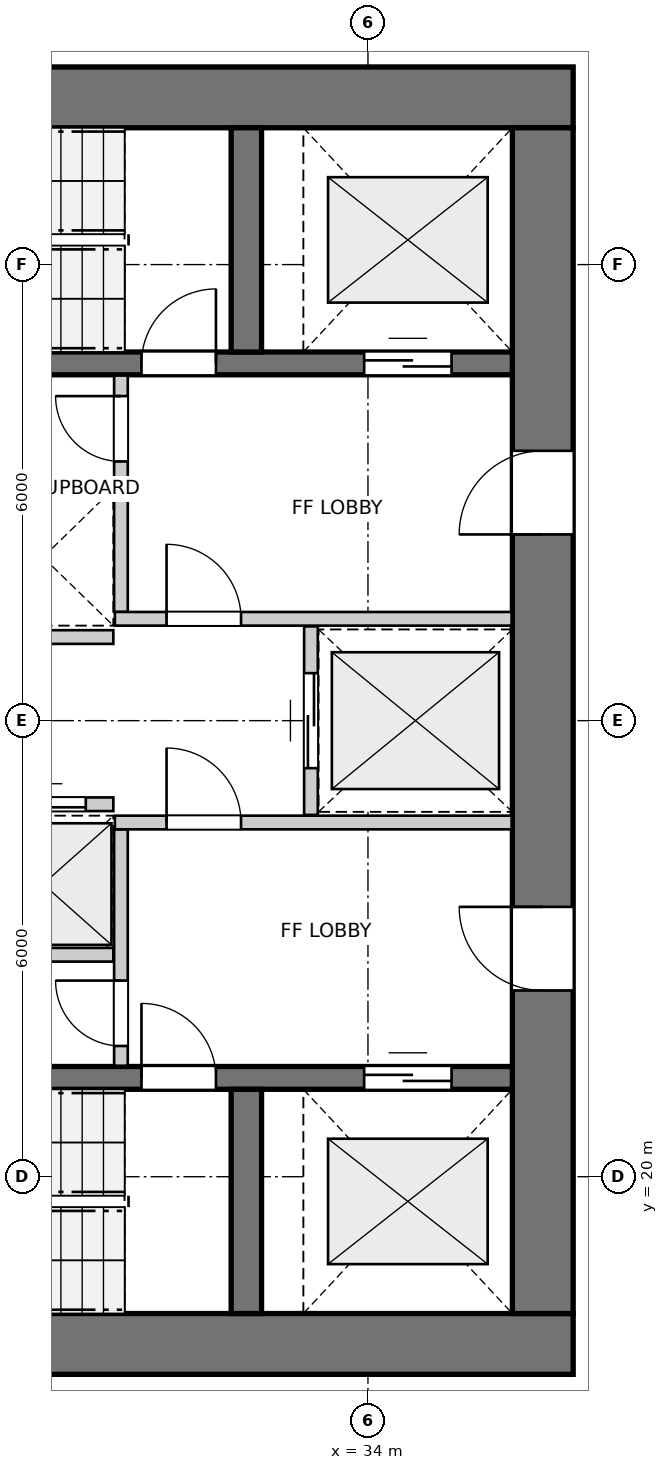
"""IFC4 building model, lengths in metres.
Left out: names, types, materials, properties, quantities, classifications, styles, units other than length and angle.
Written with IfcOpenShell. Run it as: python <this file> out.ifc"""

import sys

from ifc_helpers import new_model, si_unit, direction, frame, frame_2d, origin, place, context, subcontext, project, spatial, rectangle, extrude, source, transform, mapped, element, fill, save


model = new_model("IFC4")
c1 = context("Model", 3, precision=1e-05, world=origin(), true_north=direction((0.0, 1.0)))
c2 = subcontext(c1, "Body", "Model", "MODEL_VIEW")
j1 = project(units=[si_unit("LENGTHUNIT", "METRE"), si_unit("PLANEANGLEUNIT", "RADIAN")], contexts=[c1])
p1 = place(None, origin())
s1 = spatial("IfcSite", under=j1, at=p1, CompositionType="ELEMENT")
p2 = place(p1, origin())
s2 = spatial("IfcBuilding", under=s1, at=p2, CompositionType="ELEMENT")
p3 = place(p2, frame((0.0, 0.0, 23.8)))
s3 = spatial("IfcBuildingStorey", under=s2, at=p3, CompositionType="ELEMENT", Elevation=23.8)
for number, where, z_axis, x_axis in (
    (1, (24.0, 17.8, 0.0), (0.0, 0.0, 1.0), (1.0, 0.0, 0.0)),
    (2, (36.7, 34.2, 0.0), (0.0, 0.0, 1.0), (-1.0, 0.0, 0.0)),
):
    element("IfcWall", number, at=place(p3, frame(where, z_axis=z_axis, x_axis=x_axis)), inside=s3, PredefinedType="SHEAR", context=c2, shape_type="SweptSolid", body=[
        extrude(rectangle(XDim=12.7, YDim=0.8, at=frame_2d((6.35, 0.0))), origin(), (0.0, 0.0, 1.0), 2.935),
    ])
p4 = place(p3, frame((36.3, 18.2, 0.0), z_axis=(0.0, 0.0, 1.0), x_axis=(0.0, 1.0, 0.0)))
e3 = element("IfcWall", 3, at=p4, inside=s3, PredefinedType="SHEAR", context=c2, shape_type="SweptSolid", body=[
    extrude(rectangle(XDim=15.6, YDim=0.8, at=frame_2d((7.8, 0.0))), origin(), (0.0, 0.0, 1.0), 2.935),
])
p5 = place(p4, frame((4.25, 0.0, 0.0)))
e4 = element("IfcOpeningElement", 4, at=p5, cuts=e3, PredefinedType="OPENING", context=c2, shape_type="SweptSolid", body=[
    extrude(rectangle(XDim=1.1, YDim=2.15, at=frame_2d((0.55, 1.075))), frame((0.0, 0.41, 0.0), z_axis=(0.0, -1.0, 0.0), x_axis=(1.0, 0.0, 0.0)), (0.0, 0.0, 1.0), 0.82),
])
p6 = place(p4, frame((10.25, 0.0, 0.0)))
e5 = element("IfcOpeningElement", 5, at=p6, cuts=e3, PredefinedType="OPENING", context=c2, shape_type="SweptSolid", body=[
    extrude(rectangle(XDim=1.1, YDim=2.15, at=frame_2d((0.55, 1.075))), frame((0.0, 0.41, 0.0), z_axis=(0.0, -1.0, 0.0), x_axis=(1.0, 0.0, 0.0)), (0.0, 0.0, 1.0), 0.82),
])
p7 = place(p3, frame((24.8, 21.3, 0.0), z_axis=(0.0, 0.0, 1.0), x_axis=(1.0, 0.0, 0.0)))
e6 = element("IfcWall", 6, at=p7, inside=s3, PredefinedType="SHEAR", context=c2, shape_type="SweptSolid", body=[
    extrude(rectangle(XDim=11.1, YDim=0.3, at=frame_2d((5.55, 0.0))), origin(), (0.0, 0.0, 1.0), 2.935),
])
p8 = place(p7, frame((6.22, 0.0, 0.0)))
e7 = element("IfcOpeningElement", 7, at=p8, cuts=e6, PredefinedType="OPENING", context=c2, shape_type="SweptSolid", body=[
    extrude(rectangle(XDim=0.98, YDim=2.15, at=frame_2d((0.49, 1.075))), frame((0.0, 0.16, 0.0), z_axis=(0.0, -1.0, 0.0), x_axis=(1.0, 0.0, 0.0)), (0.0, 0.0, 1.0), 0.32),
])
p9 = place(p7, frame((9.15, 0.0, 0.0)))
e8 = element("IfcOpeningElement", 8, at=p9, cuts=e6, PredefinedType="OPENING", context=c2, shape_type="SweptSolid", body=[
    extrude(rectangle(XDim=1.15, YDim=2.15, at=frame_2d((0.575, 1.075))), frame((0.0, 0.16, 0.0), z_axis=(0.0, -1.0, 0.0), x_axis=(1.0, 0.0, 0.0)), (0.0, 0.0, 1.0), 0.32),
])
p10 = place(p3, frame((32.4, 18.2, 0.0), z_axis=(0.0, 0.0, 1.0), x_axis=(0.0, 1.0, 0.0)))
e9 = element("IfcWall", 9, at=p10, inside=s3, PredefinedType="SHEAR", context=c2, shape_type="SweptSolid", body=[
    extrude(rectangle(XDim=2.95, YDim=0.4, at=frame_2d((1.475, 0.0))), origin(), (0.0, 0.0, 1.0), 2.935),
])
p11 = place(p3, frame((24.8, 30.7, 0.0), z_axis=(0.0, 0.0, 1.0), x_axis=(1.0, 0.0, 0.0)))
e10 = element("IfcWall", 10, at=p11, inside=s3, PredefinedType="SHEAR", context=c2, shape_type="SweptSolid", body=[
    extrude(rectangle(XDim=11.1, YDim=0.3, at=frame_2d((5.55, 0.0))), origin(), (0.0, 0.0, 1.0), 2.935),
])
p12 = place(p11, frame((6.22, 0.0, 0.0)))
e11 = element("IfcOpeningElement", 11, at=p12, cuts=e10, PredefinedType="OPENING", context=c2, shape_type="SweptSolid", body=[
    extrude(rectangle(XDim=0.98, YDim=2.15, at=frame_2d((0.49, 1.075))), frame((0.0, 0.16, 0.0), z_axis=(0.0, -1.0, 0.0), x_axis=(1.0, 0.0, 0.0)), (0.0, 0.0, 1.0), 0.32),
])
p13 = place(p11, frame((9.15, 0.0, 0.0)))
e12 = element("IfcOpeningElement", 12, at=p13, cuts=e10, PredefinedType="OPENING", context=c2, shape_type="SweptSolid", body=[
    extrude(rectangle(XDim=1.15, YDim=2.15, at=frame_2d((0.575, 1.075))), frame((0.0, 0.16, 0.0), z_axis=(0.0, -1.0, 0.0), x_axis=(1.0, 0.0, 0.0)), (0.0, 0.0, 1.0), 0.32),
])
p14 = place(p3, frame((32.4, 30.85, 0.0), z_axis=(0.0, 0.0, 1.0), x_axis=(0.0, 1.0, 0.0)))
e13 = element("IfcWall", 13, at=p14, inside=s3, PredefinedType="SHEAR", context=c2, shape_type="SweptSolid", body=[
    extrude(rectangle(XDim=2.95, YDim=0.4, at=frame_2d((1.475, 0.0))), origin(), (0.0, 0.0, 1.0), 2.935),
])
p15 = place(p3, frame((30.75, 21.46, 0.0), z_axis=(0.0, 0.0, 1.0), x_axis=(0.0, 1.0, 0.0)))
e14 = element("IfcWall", 14, at=p15, inside=s3, PredefinedType="PARTITIONING", context=c2, shape_type="SweptSolid", body=[
    extrude(rectangle(XDim=3.11, YDim=0.18, at=frame_2d((1.555, 0.0))), origin(), (0.0, 0.0, 1.0), 2.935),
])
p16 = place(p15, frame((0.26, 0.0, 0.0)))
e15 = element("IfcOpeningElement", 15, at=p16, cuts=e14, PredefinedType="OPENING", context=c2, shape_type="SweptSolid", body=[
    extrude(rectangle(XDim=0.86, YDim=2.05, at=frame_2d((0.43, 1.025))), frame((0.0, 0.1, 0.0), z_axis=(0.0, -1.0, 0.0), x_axis=(1.0, 0.0, 0.0)), (0.0, 0.0, 1.0), 0.2),
])
p17 = place(p3, frame((30.67, 24.66, 0.0), z_axis=(0.0, 0.0, 1.0), x_axis=(1.0, 0.0, 0.0)))
e16 = element("IfcWall", 16, at=p17, inside=s3, PredefinedType="PARTITIONING", context=c2, shape_type="SweptSolid", body=[
    extrude(rectangle(XDim=5.22, YDim=0.18, at=frame_2d((2.61, 0.0))), origin(), (0.0, 0.0, 1.0), 2.935),
])
p18 = place(p17, frame((0.68, 0.0, 0.0)))
e17 = element("IfcOpeningElement", 17, at=p18, cuts=e16, PredefinedType="OPENING", context=c2, shape_type="SweptSolid", body=[
    extrude(rectangle(XDim=0.98, YDim=2.15, at=frame_2d((0.49, 1.075))), frame((0.0, 0.1, 0.0), z_axis=(0.0, -1.0, 0.0), x_axis=(1.0, 0.0, 0.0)), (0.0, 0.0, 1.0), 0.2),
])
p19 = place(p3, frame((30.75, 27.43, 0.0), z_axis=(0.0, 0.0, 1.0), x_axis=(0.0, 1.0, 0.0)))
e18 = element("IfcWall", 18, at=p19, inside=s3, PredefinedType="PARTITIONING", context=c2, shape_type="SweptSolid", body=[
    extrude(rectangle(XDim=3.11, YDim=0.18, at=frame_2d((1.555, 0.0))), origin(), (0.0, 0.0, 1.0), 2.935),
])
p20 = place(p19, frame((1.98, 0.0, 0.0)))
e19 = element("IfcOpeningElement", 19, at=p20, cuts=e18, PredefinedType="OPENING", context=c2, shape_type="SweptSolid", body=[
    extrude(rectangle(XDim=0.86, YDim=2.05, at=frame_2d((0.43, 1.025))), frame((0.0, 0.1, 0.0), z_axis=(0.0, -1.0, 0.0), x_axis=(1.0, 0.0, 0.0)), (0.0, 0.0, 1.0), 0.2),
])
p21 = place(p3, frame((30.67, 27.34, 0.0), z_axis=(0.0, 0.0, 1.0), x_axis=(1.0, 0.0, 0.0)))
e20 = element("IfcWall", 20, at=p21, inside=s3, PredefinedType="PARTITIONING", context=c2, shape_type="SweptSolid", body=[
    extrude(rectangle(XDim=5.22, YDim=0.18, at=frame_2d((2.61, 0.0))), origin(), (0.0, 0.0, 1.0), 2.935),
])
p22 = place(p21, frame((0.68, 0.0, 0.0)))
e21 = element("IfcOpeningElement", 21, at=p22, cuts=e20, PredefinedType="OPENING", context=c2, shape_type="SweptSolid", body=[
    extrude(rectangle(XDim=0.98, YDim=2.15, at=frame_2d((0.49, 1.075))), frame((0.0, 0.1, 0.0), z_axis=(0.0, -1.0, 0.0), x_axis=(1.0, 0.0, 0.0)), (0.0, 0.0, 1.0), 0.2),
])
p23 = place(p3, frame((33.25, 24.76, 0.0), z_axis=(0.0, 0.0, 1.0), x_axis=(0.0, 1.0, 0.0)))
e22 = element("IfcWall", 22, at=p23, inside=s3, PredefinedType="PARTITIONING", context=c2, shape_type="SweptSolid", body=[
    extrude(rectangle(XDim=2.48, YDim=0.18, at=frame_2d((1.24, 0.0))), origin(), (0.0, 0.0, 1.0), 2.935),
])
p24 = place(p23, frame((0.615, 0.0, 0.0)))
e23 = element("IfcOpeningElement", 23, at=p24, cuts=e22, PredefinedType="OPENING", context=c2, shape_type="SweptSolid", body=[
    extrude(rectangle(XDim=1.25, YDim=2.15, at=frame_2d((0.625, 1.075))), frame((0.0, 0.1, 0.0), z_axis=(0.0, -1.0, 0.0), x_axis=(1.0, 0.0, 0.0)), (0.0, 0.0, 1.0), 0.2),
])
p25 = place(p3, frame((24.81, 22.92, 0.0), z_axis=(0.0, 0.0, 1.0), x_axis=(1.0, 0.0, 0.0)))
e24 = element("IfcWall", 24, at=p25, inside=s3, PredefinedType="PARTITIONING", context=c2, shape_type="SweptSolid", body=[
    extrude(rectangle(XDim=5.84, YDim=0.18, at=frame_2d((2.92, 0.0))), origin(), (0.0, 0.0, 1.0), 2.935),
])
p26 = place(p3, frame((28.825, 24.9, 0.0), z_axis=(0.0, 0.0, 1.0), x_axis=(1.0, 0.0, 0.0)))
e25 = element("IfcWall", 25, at=p26, inside=s3, PredefinedType="PARTITIONING", context=c2, shape_type="SweptSolid", body=[
    extrude(rectangle(XDim=1.825, YDim=0.18, at=frame_2d((0.913, 0.0))), origin(), (0.0, 0.0, 1.0), 2.935),
])
p27 = place(p26, frame((0.363, 0.0, 0.0)))
e26 = element("IfcOpeningElement", 26, at=p27, cuts=e25, PredefinedType="OPENING", context=c2, shape_type="SweptSolid", body=[
    extrude(rectangle(XDim=1.1, YDim=2.15, at=frame_2d((0.55, 1.075))), frame((0.0, 0.1, 0.0), z_axis=(0.0, -1.0, 0.0), x_axis=(1.0, 0.0, 0.0)), (0.0, 0.0, 1.0), 0.2),
])
p28 = place(p3, frame((24.81, 29.08, 0.0), z_axis=(0.0, 0.0, 1.0), x_axis=(1.0, 0.0, 0.0)))
e27 = element("IfcWall", 27, at=p28, inside=s3, PredefinedType="PARTITIONING", context=c2, shape_type="SweptSolid", body=[
    extrude(rectangle(XDim=5.84, YDim=0.18, at=frame_2d((2.92, 0.0))), origin(), (0.0, 0.0, 1.0), 2.935),
])
p29 = place(p3, frame((28.825, 27.1, 0.0), z_axis=(0.0, 0.0, 1.0), x_axis=(1.0, 0.0, 0.0)))
e28 = element("IfcWall", 28, at=p29, inside=s3, PredefinedType="PARTITIONING", context=c2, shape_type="SweptSolid", body=[
    extrude(rectangle(XDim=1.825, YDim=0.18, at=frame_2d((0.913, 0.0))), origin(), (0.0, 0.0, 1.0), 2.935),
])
m1 = source(origin(), c2, "Body", "SweptSolid", [
    extrude(rectangle(XDim=0.98, YDim=2.15, at=frame_2d((0.49, 1.075))), frame((0.0, 0.025, 0.0), z_axis=(0.0, -1.0, 0.0), x_axis=(1.0, 0.0, 0.0)), (0.0, 0.0, 1.0), 0.05),
])
p30 = place(p8, origin())
e29 = element("IfcDoor", 29, at=p30, inside=s3, OperationType="SINGLE_SWING_LEFT", PredefinedType="DOOR", context=c2, shape_type="MappedRepresentation", body=[
    mapped(m1, transform((0.0, 0.0, 0.0), x_axis=(1.0, 0.0, 0.0), y_axis=(0.0, 1.0, 0.0), z_axis=(0.0, 0.0, 1.0), scale=1.0)),
])
fill(e7, e29)
m2 = source(origin(), c2, "Body", "SweptSolid", [
    extrude(rectangle(XDim=1.15, YDim=2.15, at=frame_2d((0.575, 1.075))), frame((0.0, 0.025, 0.0), z_axis=(0.0, -1.0, 0.0), x_axis=(1.0, 0.0, 0.0)), (0.0, 0.0, 1.0), 0.05),
])
p31 = place(p9, origin())
e30 = element("IfcDoor", 30, at=p31, inside=s3, OperationType="DOUBLE_DOOR_SLIDING", PredefinedType="DOOR", context=c2, shape_type="MappedRepresentation", body=[
    mapped(m2, transform((0.0, 0.0, 0.0), x_axis=(1.0, 0.0, 0.0), y_axis=(0.0, 1.0, 0.0), z_axis=(0.0, 0.0, 1.0), scale=1.0)),
])
fill(e8, e30)
p32 = place(p12, origin())
e31 = element("IfcDoor", 31, at=p32, inside=s3, OperationType="SINGLE_SWING_RIGHT", PredefinedType="DOOR", context=c2, shape_type="MappedRepresentation", body=[
    mapped(m1, transform((0.0, 0.0, 0.0), x_axis=(1.0, 0.0, 0.0), y_axis=(0.0, 1.0, 0.0), z_axis=(0.0, 0.0, 1.0), scale=1.0)),
])
fill(e11, e31)
p33 = place(p13, origin())
e32 = element("IfcDoor", 32, at=p33, inside=s3, OperationType="DOUBLE_DOOR_SLIDING", PredefinedType="DOOR", context=c2, shape_type="MappedRepresentation", body=[
    mapped(m2, transform((0.0, 0.0, 0.0), x_axis=(1.0, 0.0, 0.0), y_axis=(0.0, 1.0, 0.0), z_axis=(0.0, 0.0, 1.0), scale=1.0)),
])
fill(e12, e32)
m3 = source(origin(), c2, "Body", "SweptSolid", [
    extrude(rectangle(XDim=1.1, YDim=2.15, at=frame_2d((0.55, 1.075))), frame((0.0, 0.025, 0.0), z_axis=(0.0, -1.0, 0.0), x_axis=(1.0, 0.0, 0.0)), (0.0, 0.0, 1.0), 0.05),
])
p34 = place(p5, origin())
e33 = element("IfcDoor", 33, at=p34, inside=s3, OperationType="SINGLE_SWING_RIGHT", PredefinedType="DOOR", context=c2, shape_type="MappedRepresentation", body=[
    mapped(m3, transform((0.0, 0.0, 0.0), x_axis=(1.0, 0.0, 0.0), y_axis=(0.0, 1.0, 0.0), z_axis=(0.0, 0.0, 1.0), scale=1.0)),
])
fill(e4, e33)
p35 = place(p6, origin())
e34 = element("IfcDoor", 34, at=p35, inside=s3, OperationType="SINGLE_SWING_LEFT", PredefinedType="DOOR", context=c2, shape_type="MappedRepresentation", body=[
    mapped(m3, transform((0.0, 0.0, 0.0), x_axis=(1.0, 0.0, 0.0), y_axis=(0.0, 1.0, 0.0), z_axis=(0.0, 0.0, 1.0), scale=1.0)),
])
fill(e5, e34)
m4 = source(origin(), c2, "Body", "SweptSolid", [
    extrude(rectangle(XDim=0.86, YDim=2.05, at=frame_2d((0.43, 1.025))), frame((0.0, 0.025, 0.0), z_axis=(0.0, -1.0, 0.0), x_axis=(1.0, 0.0, 0.0)), (0.0, 0.0, 1.0), 0.05),
])
p36 = place(p16, origin())
e35 = element("IfcDoor", 35, at=p36, inside=s3, OperationType="SINGLE_SWING_RIGHT", PredefinedType="DOOR", context=c2, shape_type="MappedRepresentation", body=[
    mapped(m4, transform((0.0, 0.0, 0.0), x_axis=(1.0, 0.0, 0.0), y_axis=(0.0, 1.0, 0.0), z_axis=(0.0, 0.0, 1.0), scale=1.0)),
])
fill(e15, e35)
p37 = place(p18, origin())
e36 = element("IfcDoor", 36, at=p37, inside=s3, OperationType="SINGLE_SWING_LEFT", PredefinedType="DOOR", context=c2, shape_type="MappedRepresentation", body=[
    mapped(m1, transform((0.0, 0.0, 0.0), x_axis=(1.0, 0.0, 0.0), y_axis=(0.0, 1.0, 0.0), z_axis=(0.0, 0.0, 1.0), scale=1.0)),
])
fill(e17, e36)
p38 = place(p20, origin())
e37 = element("IfcDoor", 37, at=p38, inside=s3, OperationType="SINGLE_SWING_RIGHT", PredefinedType="DOOR", context=c2, shape_type="MappedRepresentation", body=[
    mapped(m4, transform((0.0, 0.0, 0.0), x_axis=(1.0, 0.0, 0.0), y_axis=(0.0, 1.0, 0.0), z_axis=(0.0, 0.0, 1.0), scale=1.0)),
])
fill(e19, e37)
p39 = place(p22, origin())
e38 = element("IfcDoor", 38, at=p39, inside=s3, OperationType="SINGLE_SWING_LEFT", PredefinedType="DOOR", context=c2, shape_type="MappedRepresentation", body=[
    mapped(m1, transform((0.0, 0.0, 0.0), x_axis=(1.0, 0.0, 0.0), y_axis=(0.0, 1.0, 0.0), z_axis=(0.0, 0.0, 1.0), scale=1.0)),
])
fill(e21, e38)
m5 = source(origin(), c2, "Body", "SweptSolid", [
    extrude(rectangle(XDim=1.25, YDim=2.15, at=frame_2d((0.625, 1.075))), frame((0.0, 0.025, 0.0), z_axis=(0.0, -1.0, 0.0), x_axis=(1.0, 0.0, 0.0)), (0.0, 0.0, 1.0), 0.05),
])
p40 = place(p24, origin())
e39 = element("IfcDoor", 39, at=p40, inside=s3, OperationType="DOUBLE_DOOR_SLIDING", PredefinedType="DOOR", context=c2, shape_type="MappedRepresentation", body=[
    mapped(m5, transform((0.0, 0.0, 0.0), x_axis=(1.0, 0.0, 0.0), y_axis=(0.0, 1.0, 0.0), z_axis=(0.0, 0.0, 1.0), scale=1.0)),
])
fill(e23, e39)
p41 = place(p27, origin())
e40 = element("IfcDoor", 40, at=p41, inside=s3, OperationType="DOUBLE_DOOR_SLIDING", PredefinedType="DOOR", context=c2, shape_type="MappedRepresentation", body=[
    mapped(m3, transform((0.0, 0.0, 0.0), x_axis=(1.0, 0.0, 0.0), y_axis=(0.0, 1.0, 0.0), z_axis=(0.0, 0.0, 1.0), scale=1.0)),
])
fill(e26, e40)
save(model, sys.argv[1])
